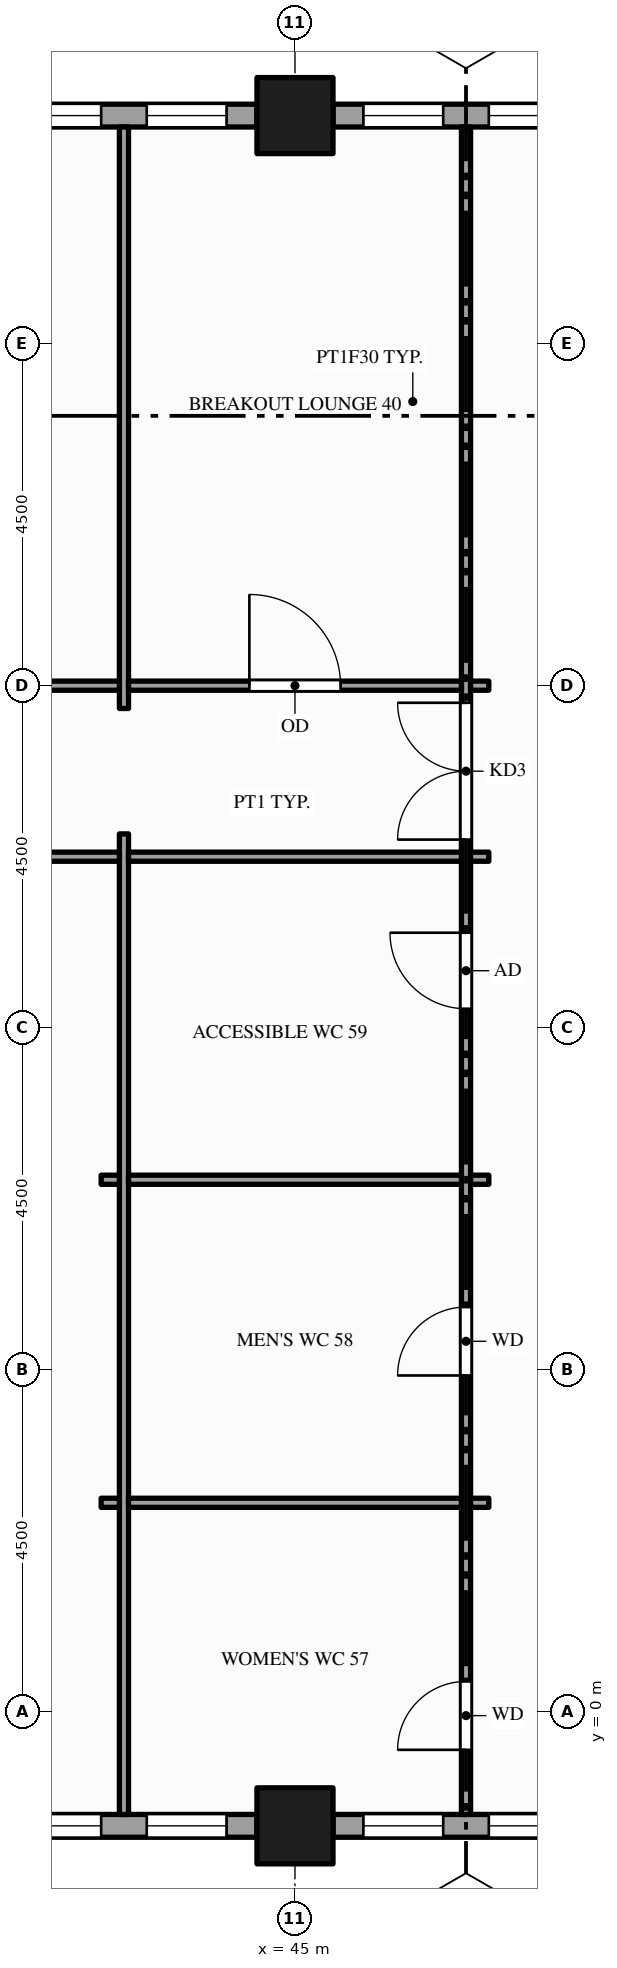
"""IFC4 building model, lengths in metres.
Left out: names, types, materials, properties, quantities, classifications, styles, units other than length and angle.
Written with IfcOpenShell. Run it as: python <this file> out.ifc"""

import sys

from ifc_helpers import new_model, si_unit, direction, frame, frame_2d, origin, origin_2d, place, context, subcontext, project, spatial, rectangle, hollow_rectangle, extrude, element, fill, save


model = new_model("IFC4")
c1 = context("Model", 3, precision=1e-05, world=origin(), true_north=direction((0.0, 1.0)))
c2 = subcontext(c1, "Body", "Model", "MODEL_VIEW")
j1 = project(units=[si_unit("LENGTHUNIT", "METRE"), si_unit("PLANEANGLEUNIT", "RADIAN")], contexts=[c1])
p1 = place(None, origin())
s1 = spatial("IfcSite", under=j1, at=p1, CompositionType="ELEMENT")
p2 = place(p1, origin())
s2 = spatial("IfcBuilding", under=s1, at=p2, CompositionType="ELEMENT")
p3 = place(p2, frame((0.0, 0.0, 83.0)))
s3 = spatial("IfcBuildingStorey", under=s2, at=p3, CompositionType="ELEMENT", Elevation=83.0)
for number, where, z_axis, x_axis in (
    (1, (45.0, -1.5, -0.15), (0.0, 0.0, 1.0), (1.0, 0.0, 0.0)),
    (2, (45.0, 21.0, -0.15), (0.0, 0.0, 1.0), (1.0, 0.0, 0.0)),
):
    element("IfcColumn", number, at=place(p3, frame(where, z_axis=z_axis, x_axis=x_axis)), inside=s3, PredefinedType="COLUMN", context=c2, shape_type="SweptSolid", body=[
        extrude(hollow_rectangle(XDim=1.0, YDim=1.0, WallThickness=0.05, at=origin_2d()), origin(), (0.0, 0.0, 1.0), 4.0),
    ])
p4 = place(p3, frame((41.0, -1.5, 0.0), z_axis=(0.0, 0.0, 1.0), x_axis=(1.0, 0.0, 0.0)))
e3 = element("IfcWall", 3, at=p4, inside=s3, PredefinedType="STANDARD", context=c2, shape_type="SweptSolid", body=[
    extrude(rectangle(XDim=3.5, YDim=0.3, at=frame_2d((1.75, 0.0))), origin(), (0.0, 0.0, 1.0), 3.154),
])
p5 = place(p4, frame((0.4, 0.0, 0.9)))
e4 = element("IfcOpeningElement", 4, at=p5, cuts=e3, PredefinedType="OPENING", context=c2, shape_type="SweptSolid", body=[
    extrude(rectangle(XDim=1.05, YDim=2.0, at=frame_2d((0.525, 1.0))), frame((0.0, 0.16, 0.0), z_axis=(0.0, -1.0, 0.0), x_axis=(1.0, 0.0, 0.0)), (0.0, 0.0, 1.0), 0.32),
])
p6 = place(p4, frame((2.05, 0.0, 0.9)))
e5 = element("IfcOpeningElement", 5, at=p6, cuts=e3, PredefinedType="OPENING", context=c2, shape_type="SweptSolid", body=[
    extrude(rectangle(XDim=1.05, YDim=2.0, at=frame_2d((0.525, 1.0))), frame((0.0, 0.16, 0.0), z_axis=(0.0, -1.0, 0.0), x_axis=(1.0, 0.0, 0.0)), (0.0, 0.0, 1.0), 0.32),
])
p7 = place(p3, frame((45.5, -1.5, 0.0), z_axis=(0.0, 0.0, 1.0), x_axis=(1.0, 0.0, 0.0)))
e6 = element("IfcWall", 6, at=p7, inside=s3, PredefinedType="STANDARD", context=c2, shape_type="SweptSolid", body=[
    extrude(rectangle(XDim=3.5, YDim=0.3, at=frame_2d((1.75, 0.0))), origin(), (0.0, 0.0, 1.0), 3.154),
])
p8 = place(p7, frame((0.4, 0.0, 0.9)))
e7 = element("IfcOpeningElement", 7, at=p8, cuts=e6, PredefinedType="OPENING", context=c2, shape_type="SweptSolid", body=[
    extrude(rectangle(XDim=1.05, YDim=2.0, at=frame_2d((0.525, 1.0))), frame((0.0, 0.16, 0.0), z_axis=(0.0, -1.0, 0.0), x_axis=(1.0, 0.0, 0.0)), (0.0, 0.0, 1.0), 0.32),
])
p9 = place(p7, frame((2.05, 0.0, 0.9)))
e8 = element("IfcOpeningElement", 8, at=p9, cuts=e6, PredefinedType="OPENING", context=c2, shape_type="SweptSolid", body=[
    extrude(rectangle(XDim=1.05, YDim=2.0, at=frame_2d((0.525, 1.0))), frame((0.0, 0.16, 0.0), z_axis=(0.0, -1.0, 0.0), x_axis=(1.0, 0.0, 0.0)), (0.0, 0.0, 1.0), 0.32),
])
p10 = place(p3, frame((49.0, 21.0, 0.0), z_axis=(0.0, 0.0, 1.0), x_axis=(-1.0, 0.0, 0.0)))
e9 = element("IfcWall", 9, at=p10, inside=s3, PredefinedType="STANDARD", context=c2, shape_type="SweptSolid", body=[
    extrude(rectangle(XDim=3.5, YDim=0.3, at=frame_2d((1.75, 0.0))), origin(), (0.0, 0.0, 1.0), 3.154),
])
p11 = place(p10, frame((0.4, 0.0, 0.9)))
e10 = element("IfcOpeningElement", 10, at=p11, cuts=e9, PredefinedType="OPENING", context=c2, shape_type="SweptSolid", body=[
    extrude(rectangle(XDim=1.05, YDim=2.0, at=frame_2d((0.525, 1.0))), frame((0.0, 0.16, 0.0), z_axis=(0.0, -1.0, 0.0), x_axis=(1.0, 0.0, 0.0)), (0.0, 0.0, 1.0), 0.32),
])
p12 = place(p10, frame((2.05, 0.0, 0.9)))
e11 = element("IfcOpeningElement", 11, at=p12, cuts=e9, PredefinedType="OPENING", context=c2, shape_type="SweptSolid", body=[
    extrude(rectangle(XDim=1.05, YDim=2.0, at=frame_2d((0.525, 1.0))), frame((0.0, 0.16, 0.0), z_axis=(0.0, -1.0, 0.0), x_axis=(1.0, 0.0, 0.0)), (0.0, 0.0, 1.0), 0.32),
])
p13 = place(p3, frame((44.5, 21.0, 0.0), z_axis=(0.0, 0.0, 1.0), x_axis=(-1.0, 0.0, 0.0)))
e12 = element("IfcWall", 12, at=p13, inside=s3, PredefinedType="STANDARD", context=c2, shape_type="SweptSolid", body=[
    extrude(rectangle(XDim=3.5, YDim=0.3, at=frame_2d((1.75, 0.0))), origin(), (0.0, 0.0, 1.0), 3.154),
])
p14 = place(p13, frame((0.4, 0.0, 0.9)))
e13 = element("IfcOpeningElement", 13, at=p14, cuts=e12, PredefinedType="OPENING", context=c2, shape_type="SweptSolid", body=[
    extrude(rectangle(XDim=1.05, YDim=2.0, at=frame_2d((0.525, 1.0))), frame((0.0, 0.16, 0.0), z_axis=(0.0, -1.0, 0.0), x_axis=(1.0, 0.0, 0.0)), (0.0, 0.0, 1.0), 0.32),
])
p15 = place(p13, frame((2.05, 0.0, 0.9)))
e14 = element("IfcOpeningElement", 14, at=p15, cuts=e12, PredefinedType="OPENING", context=c2, shape_type="SweptSolid", body=[
    extrude(rectangle(XDim=1.05, YDim=2.0, at=frame_2d((0.525, 1.0))), frame((0.0, 0.16, 0.0), z_axis=(0.0, -1.0, 0.0), x_axis=(1.0, 0.0, 0.0)), (0.0, 0.0, 1.0), 0.32),
])
p16 = place(p3, frame((42.75, -1.35, 0.0), z_axis=(0.0, 0.0, 1.0), x_axis=(0.0, 1.0, 0.0)))
e15 = element("IfcWall", 15, at=p16, inside=s3, PredefinedType="PARTITIONING", context=c2, shape_type="SweptSolid", body=[
    extrude(rectangle(XDim=12.9, YDim=0.12, at=frame_2d((6.45, 0.0))), origin(), (0.0, 0.0, 1.0), 2.938),
])
p17 = place(p3, frame((42.75, 13.2, 0.0), z_axis=(0.0, 0.0, 1.0), x_axis=(0.0, 1.0, 0.0)))
e16 = element("IfcWall", 16, at=p17, inside=s3, PredefinedType="PARTITIONING", context=c2, shape_type="SweptSolid", body=[
    extrude(rectangle(XDim=7.65, YDim=0.12, at=frame_2d((3.825, 0.0))), origin(), (0.0, 0.0, 1.0), 2.938),
])
p18 = place(p3, frame((47.25, -1.35, 0.0), z_axis=(0.0, 0.0, 1.0), x_axis=(0.0, 1.0, 0.0)))
e17 = element("IfcWall", 17, at=p18, inside=s3, PredefinedType="PARTITIONING", context=c2, shape_type="SweptSolid", body=[
    extrude(rectangle(XDim=22.2, YDim=0.12, at=frame_2d((11.1, 0.0))), origin(), (0.0, 0.0, 1.0), 2.938),
])
p19 = place(p18, frame((12.825, 0.0, 0.0)))
e18 = element("IfcOpeningElement", 18, at=p19, cuts=e17, PredefinedType="OPENING", context=c2, shape_type="SweptSolid", body=[
    extrude(rectangle(XDim=1.8, YDim=2.1, at=frame_2d((0.9, 1.05))), frame((0.0, 0.07, 0.0), z_axis=(0.0, -1.0, 0.0), x_axis=(1.0, 0.0, 0.0)), (0.0, 0.0, 1.0), 0.14),
])
p20 = place(p18, frame((0.85, 0.0, 0.0)))
e19 = element("IfcOpeningElement", 19, at=p20, cuts=e17, PredefinedType="OPENING", context=c2, shape_type="SweptSolid", body=[
    extrude(rectangle(XDim=0.9, YDim=2.1, at=frame_2d((0.45, 1.05))), frame((0.0, 0.07, 0.0), z_axis=(0.0, -1.0, 0.0), x_axis=(1.0, 0.0, 0.0)), (0.0, 0.0, 1.0), 0.14),
])
p21 = place(p18, frame((5.775, 0.0, 0.0)))
e20 = element("IfcOpeningElement", 20, at=p21, cuts=e17, PredefinedType="OPENING", context=c2, shape_type="SweptSolid", body=[
    extrude(rectangle(XDim=0.9, YDim=2.1, at=frame_2d((0.45, 1.05))), frame((0.0, 0.07, 0.0), z_axis=(0.0, -1.0, 0.0), x_axis=(1.0, 0.0, 0.0)), (0.0, 0.0, 1.0), 0.14),
])
p22 = place(p18, frame((10.6, 0.0, 0.0)))
e21 = element("IfcOpeningElement", 21, at=p22, cuts=e17, PredefinedType="OPENING", context=c2, shape_type="SweptSolid", body=[
    extrude(rectangle(XDim=1.0, YDim=2.1, at=frame_2d((0.5, 1.05))), frame((0.0, 0.07, 0.0), z_axis=(0.0, -1.0, 0.0), x_axis=(1.0, 0.0, 0.0)), (0.0, 0.0, 1.0), 0.14),
])
p23 = place(p3, frame((42.45, 2.75, 0.0), z_axis=(0.0, 0.0, 1.0), x_axis=(1.0, 0.0, 0.0)))
e22 = element("IfcWall", 22, at=p23, inside=s3, PredefinedType="PARTITIONING", context=c2, shape_type="SweptSolid", body=[
    extrude(rectangle(XDim=0.24, YDim=0.12, at=frame_2d((0.12, 0.0))), origin(), (0.0, 0.0, 1.0), 2.938),
])
p24 = place(p3, frame((42.81, 2.75, 0.0), z_axis=(0.0, 0.0, 1.0), x_axis=(1.0, 0.0, 0.0)))
e23 = element("IfcWall", 23, at=p24, inside=s3, PredefinedType="PARTITIONING", context=c2, shape_type="SweptSolid", body=[
    extrude(rectangle(XDim=4.38, YDim=0.12, at=frame_2d((2.19, 0.0))), origin(), (0.0, 0.0, 1.0), 2.938),
])
for number, where, z_axis, x_axis in (
    (24, (47.31, 2.75, 0.0), (0.0, 0.0, 1.0), (1.0, 0.0, 0.0)),
    (25, (42.45, 7.0, 0.0), (0.0, 0.0, 1.0), (1.0, 0.0, 0.0)),
):
    element("IfcWall", number, at=place(p3, frame(where, z_axis=z_axis, x_axis=x_axis)), inside=s3, PredefinedType="PARTITIONING", context=c2, shape_type="SweptSolid", body=[
        extrude(rectangle(XDim=0.24, YDim=0.12, at=frame_2d((0.12, 0.0))), origin(), (0.0, 0.0, 1.0), 2.938),
    ])
p25 = place(p3, frame((42.81, 7.0, 0.0), z_axis=(0.0, 0.0, 1.0), x_axis=(1.0, 0.0, 0.0)))
e26 = element("IfcWall", 26, at=p25, inside=s3, PredefinedType="PARTITIONING", context=c2, shape_type="SweptSolid", body=[
    extrude(rectangle(XDim=4.38, YDim=0.12, at=frame_2d((2.19, 0.0))), origin(), (0.0, 0.0, 1.0), 2.938),
])
p26 = place(p3, frame((47.31, 7.0, 0.0), z_axis=(0.0, 0.0, 1.0), x_axis=(1.0, 0.0, 0.0)))
e27 = element("IfcWall", 27, at=p26, inside=s3, PredefinedType="PARTITIONING", context=c2, shape_type="SweptSolid", body=[
    extrude(rectangle(XDim=0.24, YDim=0.12, at=frame_2d((0.12, 0.0))), origin(), (0.0, 0.0, 1.0), 2.938),
])
p27 = place(p3, frame((36.06, 11.25, 0.0), z_axis=(0.0, 0.0, 1.0), x_axis=(1.0, 0.0, 0.0)))
e28 = element("IfcWall", 28, at=p27, inside=s3, PredefinedType="PARTITIONING", context=c2, shape_type="SweptSolid", body=[
    extrude(rectangle(XDim=6.63, YDim=0.12, at=frame_2d((3.315, 0.0))), origin(), (0.0, 0.0, 1.0), 2.938),
])
p28 = place(p27, frame((2.715, 0.0, 0.0)))
e29 = element("IfcOpeningElement", 29, at=p28, cuts=e28, PredefinedType="OPENING", context=c2, shape_type="SweptSolid", body=[
    extrude(rectangle(XDim=1.2, YDim=2.1, at=frame_2d((0.6, 1.05))), frame((0.0, 0.07, 0.0), z_axis=(0.0, -1.0, 0.0), x_axis=(1.0, 0.0, 0.0)), (0.0, 0.0, 1.0), 0.14),
])
p29 = place(p3, frame((42.81, 11.25, 0.0), z_axis=(0.0, 0.0, 1.0), x_axis=(1.0, 0.0, 0.0)))
e30 = element("IfcWall", 30, at=p29, inside=s3, PredefinedType="PARTITIONING", context=c2, shape_type="SweptSolid", body=[
    extrude(rectangle(XDim=4.38, YDim=0.12, at=frame_2d((2.19, 0.0))), origin(), (0.0, 0.0, 1.0), 2.938),
])
p30 = place(p3, frame((47.31, 11.25, 0.0), z_axis=(0.0, 0.0, 1.0), x_axis=(1.0, 0.0, 0.0)))
e31 = element("IfcWall", 31, at=p30, inside=s3, PredefinedType="PARTITIONING", context=c2, shape_type="SweptSolid", body=[
    extrude(rectangle(XDim=0.24, YDim=0.12, at=frame_2d((0.12, 0.0))), origin(), (0.0, 0.0, 1.0), 2.938),
])
p31 = place(p3, frame((36.06, 13.5, 0.0), z_axis=(0.0, 0.0, 1.0), x_axis=(1.0, 0.0, 0.0)))
e32 = element("IfcWall", 32, at=p31, inside=s3, PredefinedType="PARTITIONING", context=c2, shape_type="SweptSolid", body=[
    extrude(rectangle(XDim=6.63, YDim=0.12, at=frame_2d((3.315, 0.0))), origin(), (0.0, 0.0, 1.0), 2.938),
])
p32 = place(p31, frame((2.715, 0.0, 0.0)))
e33 = element("IfcOpeningElement", 33, at=p32, cuts=e32, PredefinedType="OPENING", context=c2, shape_type="SweptSolid", body=[
    extrude(rectangle(XDim=1.2, YDim=2.1, at=frame_2d((0.6, 1.05))), frame((0.0, 0.07, 0.0), z_axis=(0.0, -1.0, 0.0), x_axis=(1.0, 0.0, 0.0)), (0.0, 0.0, 1.0), 0.14),
])
p33 = place(p3, frame((42.81, 13.5, 0.0), z_axis=(0.0, 0.0, 1.0), x_axis=(1.0, 0.0, 0.0)))
e34 = element("IfcWall", 34, at=p33, inside=s3, PredefinedType="PARTITIONING", context=c2, shape_type="SweptSolid", body=[
    extrude(rectangle(XDim=4.38, YDim=0.12, at=frame_2d((2.19, 0.0))), origin(), (0.0, 0.0, 1.0), 2.938),
])
p34 = place(p33, frame((1.59, 0.0, 0.0)))
e35 = element("IfcOpeningElement", 35, at=p34, cuts=e34, PredefinedType="OPENING", context=c2, shape_type="SweptSolid", body=[
    extrude(rectangle(XDim=1.2, YDim=2.1, at=frame_2d((0.6, 1.05))), frame((0.0, 0.07, 0.0), z_axis=(0.0, -1.0, 0.0), x_axis=(1.0, 0.0, 0.0)), (0.0, 0.0, 1.0), 0.14),
])
p35 = place(p3, frame((47.31, 13.5, 0.0), z_axis=(0.0, 0.0, 1.0), x_axis=(1.0, 0.0, 0.0)))
e36 = element("IfcWall", 36, at=p35, inside=s3, PredefinedType="PARTITIONING", context=c2, shape_type="SweptSolid", body=[
    extrude(rectangle(XDim=0.24, YDim=0.12, at=frame_2d((0.12, 0.0))), origin(), (0.0, 0.0, 1.0), 2.938),
])
p36 = place(p5, origin())
e37 = element("IfcWindow", 37, at=p36, inside=s3, PartitioningType="SINGLE_PANEL", PredefinedType="WINDOW", context=c2, shape_type="SweptSolid", body=[
    extrude(rectangle(XDim=1.05, YDim=2.0, at=frame_2d((0.525, 1.0))), frame((0.0, 0.03, 0.0), z_axis=(0.0, -1.0, 0.0), x_axis=(1.0, 0.0, 0.0)), (0.0, 0.0, 1.0), 0.06),
])
fill(e4, e37)
p37 = place(p6, origin())
e38 = element("IfcWindow", 38, at=p37, inside=s3, PartitioningType="SINGLE_PANEL", PredefinedType="WINDOW", context=c2, shape_type="SweptSolid", body=[
    extrude(rectangle(XDim=1.05, YDim=2.0, at=frame_2d((0.525, 1.0))), frame((0.0, 0.03, 0.0), z_axis=(0.0, -1.0, 0.0), x_axis=(1.0, 0.0, 0.0)), (0.0, 0.0, 1.0), 0.06),
])
fill(e5, e38)
p38 = place(p8, origin())
e39 = element("IfcWindow", 39, at=p38, inside=s3, PartitioningType="SINGLE_PANEL", PredefinedType="WINDOW", context=c2, shape_type="SweptSolid", body=[
    extrude(rectangle(XDim=1.05, YDim=2.0, at=frame_2d((0.525, 1.0))), frame((0.0, 0.03, 0.0), z_axis=(0.0, -1.0, 0.0), x_axis=(1.0, 0.0, 0.0)), (0.0, 0.0, 1.0), 0.06),
])
fill(e7, e39)
p39 = place(p9, origin())
e40 = element("IfcWindow", 40, at=p39, inside=s3, PartitioningType="SINGLE_PANEL", PredefinedType="WINDOW", context=c2, shape_type="SweptSolid", body=[
    extrude(rectangle(XDim=1.05, YDim=2.0, at=frame_2d((0.525, 1.0))), frame((0.0, 0.03, 0.0), z_axis=(0.0, -1.0, 0.0), x_axis=(1.0, 0.0, 0.0)), (0.0, 0.0, 1.0), 0.06),
])
fill(e8, e40)
p40 = place(p11, origin())
e41 = element("IfcWindow", 41, at=p40, inside=s3, PartitioningType="SINGLE_PANEL", PredefinedType="WINDOW", context=c2, shape_type="SweptSolid", body=[
    extrude(rectangle(XDim=1.05, YDim=2.0, at=frame_2d((0.525, 1.0))), frame((0.0, 0.03, 0.0), z_axis=(0.0, -1.0, 0.0), x_axis=(1.0, 0.0, 0.0)), (0.0, 0.0, 1.0), 0.06),
])
fill(e10, e41)
p41 = place(p12, origin())
e42 = element("IfcWindow", 42, at=p41, inside=s3, PartitioningType="SINGLE_PANEL", PredefinedType="WINDOW", context=c2, shape_type="SweptSolid", body=[
    extrude(rectangle(XDim=1.05, YDim=2.0, at=frame_2d((0.525, 1.0))), frame((0.0, 0.03, 0.0), z_axis=(0.0, -1.0, 0.0), x_axis=(1.0, 0.0, 0.0)), (0.0, 0.0, 1.0), 0.06),
])
fill(e11, e42)
p42 = place(p14, origin())
e43 = element("IfcWindow", 43, at=p42, inside=s3, PartitioningType="SINGLE_PANEL", PredefinedType="WINDOW", context=c2, shape_type="SweptSolid", body=[
    extrude(rectangle(XDim=1.05, YDim=2.0, at=frame_2d((0.525, 1.0))), frame((0.0, 0.03, 0.0), z_axis=(0.0, -1.0, 0.0), x_axis=(1.0, 0.0, 0.0)), (0.0, 0.0, 1.0), 0.06),
])
fill(e13, e43)
p43 = place(p15, origin())
e44 = element("IfcWindow", 44, at=p43, inside=s3, PartitioningType="SINGLE_PANEL", PredefinedType="WINDOW", context=c2, shape_type="SweptSolid", body=[
    extrude(rectangle(XDim=1.05, YDim=2.0, at=frame_2d((0.525, 1.0))), frame((0.0, 0.03, 0.0), z_axis=(0.0, -1.0, 0.0), x_axis=(1.0, 0.0, 0.0)), (0.0, 0.0, 1.0), 0.06),
])
fill(e14, e44)
p44 = place(p19, origin())
e45 = element("IfcDoor", 45, at=p44, inside=s3, OperationType="DOUBLE_DOOR_SINGLE_SWING", PredefinedType="DOOR", context=c2, shape_type="SweptSolid", body=[
    extrude(rectangle(XDim=1.8, YDim=2.1, at=frame_2d((0.9, 1.05))), frame((0.0, 0.025, 0.0), z_axis=(0.0, -1.0, 0.0), x_axis=(1.0, 0.0, 0.0)), (0.0, 0.0, 1.0), 0.05),
])
fill(e18, e45)
p45 = place(p20, origin())
e46 = element("IfcDoor", 46, at=p45, inside=s3, OperationType="SINGLE_SWING_LEFT", PredefinedType="DOOR", context=c2, shape_type="SweptSolid", body=[
    extrude(rectangle(XDim=0.9, YDim=2.1, at=frame_2d((0.45, 1.05))), frame((0.0, 0.025, 0.0), z_axis=(0.0, -1.0, 0.0), x_axis=(1.0, 0.0, 0.0)), (0.0, 0.0, 1.0), 0.05),
])
fill(e19, e46)
p46 = place(p21, origin())
e47 = element("IfcDoor", 47, at=p46, inside=s3, OperationType="SINGLE_SWING_LEFT", PredefinedType="DOOR", context=c2, shape_type="SweptSolid", body=[
    extrude(rectangle(XDim=0.9, YDim=2.1, at=frame_2d((0.45, 1.05))), frame((0.0, 0.025, 0.0), z_axis=(0.0, -1.0, 0.0), x_axis=(1.0, 0.0, 0.0)), (0.0, 0.0, 1.0), 0.05),
])
fill(e20, e47)
p47 = place(p22, origin())
e48 = element("IfcDoor", 48, at=p47, inside=s3, OperationType="SINGLE_SWING_RIGHT", PredefinedType="DOOR", context=c2, shape_type="SweptSolid", body=[
    extrude(rectangle(XDim=1.0, YDim=2.1, at=frame_2d((0.5, 1.05))), frame((0.0, 0.025, 0.0), z_axis=(0.0, -1.0, 0.0), x_axis=(1.0, 0.0, 0.0)), (0.0, 0.0, 1.0), 0.05),
])
fill(e21, e48)
p48 = place(p34, origin())
e49 = element("IfcDoor", 49, at=p48, inside=s3, OperationType="SINGLE_SWING_LEFT", PredefinedType="DOOR", context=c2, shape_type="SweptSolid", body=[
    extrude(rectangle(XDim=1.2, YDim=2.1, at=frame_2d((0.6, 1.05))), frame((0.0, 0.025, 0.0), z_axis=(0.0, -1.0, 0.0), x_axis=(1.0, 0.0, 0.0)), (0.0, 0.0, 1.0), 0.05),
])
fill(e35, e49)
save(model, sys.argv[1])
